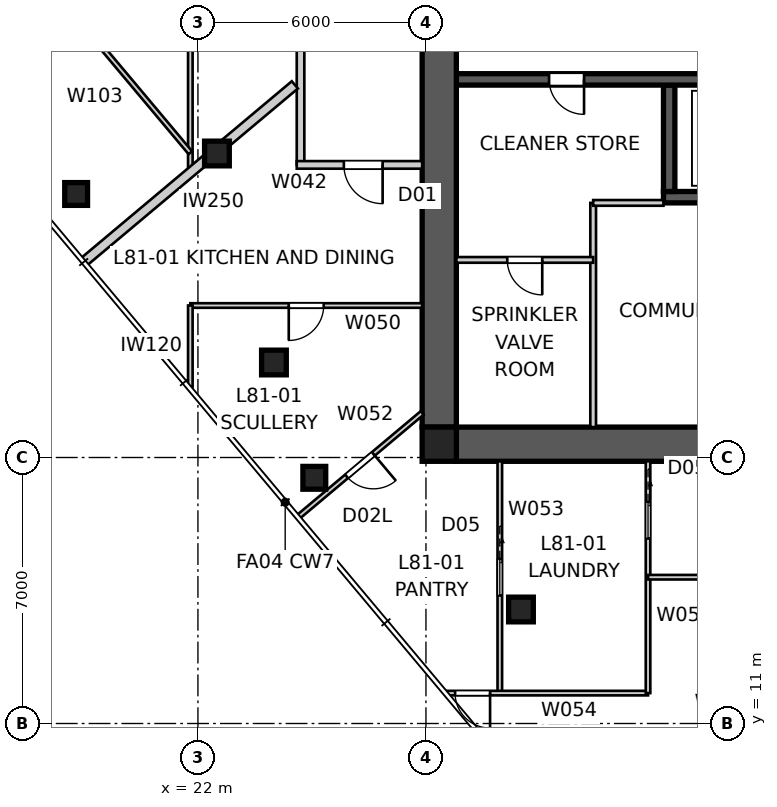
"""IFC4 building model, lengths in metres.
Left out: names, types, materials, properties, quantities, classifications, styles, units other than length and angle.
Written with IfcOpenShell. Run it as: python <this file> out.ifc"""

import sys

from ifc_helpers import new_model, si_unit, direction, frame, frame_2d, origin, origin_2d, place, context, subcontext, project, spatial, polyline, rectangle, outline, extrude, element, fill, save


model = new_model("IFC4")
c1 = context("Model", 3, precision=1e-05, world=origin(), true_north=direction((0.0, 1.0)))
c2 = subcontext(c1, "Body", "Model", "MODEL_VIEW")
j1 = project(units=[si_unit("LENGTHUNIT", "METRE"), si_unit("PLANEANGLEUNIT", "RADIAN")], contexts=[c1])
p1 = place(None, origin())
s1 = spatial("IfcSite", under=j1, at=p1, CompositionType="ELEMENT")
p2 = place(p1, origin())
s2 = spatial("IfcBuilding", under=s1, at=p2, CompositionType="ELEMENT")
p3 = place(p2, frame((0.0, 0.0, 293.0)))
s3 = spatial("IfcBuildingStorey", under=s2, at=p3, CompositionType="ELEMENT", Elevation=293.0)
p4 = place(p3, frame((51.2, 18.35, 0.0), z_axis=(0.0, 0.0, 1.0), x_axis=(-1.0, 0.0, 0.0)))
e1 = element("IfcWall", 1, at=p4, inside=s3, PredefinedType="SHEAR", context=c2, shape_type="SweptSolid", body=[
    extrude(outline(polyline([(0.0, -0.45), (22.4, -0.45), (22.4, -0.025), (22.85, -0.025), (22.85, 0.025), (22.4, 0.025), (22.4, 0.45), (0.0, 0.45), (0.0, 0.025), (-0.45, 0.025), (-0.45, -0.025), (0.0, -0.025), (0.0, -0.45)])), origin(), (0.0, 0.0, 1.0), 3.4),
])
p5 = place(p3, frame((28.35, 41.2, 0.0), z_axis=(0.0, 0.0, 1.0), x_axis=(0.0, -1.0, 0.0)))
e2 = element("IfcWall", 2, at=p5, inside=s3, PredefinedType="SHEAR", context=c2, shape_type="SweptSolid", body=[
    extrude(outline(polyline([(0.0, -0.45), (22.4, -0.45), (22.4, -0.025), (22.85, -0.025), (22.85, 0.025), (22.4, 0.025), (22.4, 0.45), (0.0, 0.45), (0.0, 0.025), (-0.45, 0.025), (-0.45, -0.025), (0.0, -0.025), (0.0, -0.45)])), origin(), (0.0, 0.0, 1.0), 3.4),
])
p6 = place(p5, frame((11.14, 0.0, 0.0)))
e3 = element("IfcOpeningElement", 3, at=p6, cuts=e2, PredefinedType="OPENING", context=c2, shape_type="SweptSolid", body=[
    extrude(rectangle(XDim=1.02, YDim=2.4, at=frame_2d((0.51, 1.2))), frame((0.0, 0.46, 0.0), z_axis=(0.0, -1.0, 0.0), x_axis=(1.0, 0.0, 0.0)), (0.0, 0.0, 1.0), 0.92),
])
p7 = place(p3, frame((51.2, 27.95, 0.0), z_axis=(0.0, 0.0, 1.0), x_axis=(-1.0, 0.0, 0.0)))
e4 = element("IfcWall", 4, at=p7, inside=s3, PredefinedType="SHEAR", context=c2, shape_type="SweptSolid", body=[
    extrude(rectangle(XDim=22.4, YDim=0.3, at=frame_2d((11.2, 0.0))), origin(), (0.0, 0.0, 1.0), 3.4),
])
p8 = place(p7, frame((19.04, 0.0, 0.0)))
e5 = element("IfcOpeningElement", 5, at=p8, cuts=e4, PredefinedType="OPENING", context=c2, shape_type="SweptSolid", body=[
    extrude(rectangle(XDim=0.92, YDim=2.1, at=frame_2d((0.46, 1.05))), frame((0.0, 0.16, 0.0), z_axis=(0.0, -1.0, 0.0), x_axis=(1.0, 0.0, 0.0)), (0.0, 0.0, 1.0), 0.32),
])
p9 = place(p7, frame((1.265, 0.0, 0.0)))
e6 = element("IfcOpeningElement", 6, at=p9, cuts=e4, PredefinedType="OPENING", context=c2, shape_type="SweptSolid", body=[
    extrude(rectangle(XDim=1.02, YDim=2.1, at=frame_2d((0.51, 1.05))), frame((0.0, 0.16, 0.0), z_axis=(0.0, -1.0, 0.0), x_axis=(1.0, 0.0, 0.0)), (0.0, 0.0, 1.0), 0.32),
])
p10 = place(p7, frame((4.015, 0.0, 0.0)))
e7 = element("IfcOpeningElement", 7, at=p10, cuts=e4, PredefinedType="OPENING", context=c2, shape_type="SweptSolid", body=[
    extrude(rectangle(XDim=0.92, YDim=2.1, at=frame_2d((0.46, 1.05))), frame((0.0, 0.16, 0.0), z_axis=(0.0, -1.0, 0.0), x_axis=(1.0, 0.0, 0.0)), (0.0, 0.0, 1.0), 0.32),
])
p11 = place(p7, frame((8.89, 0.0, 0.0)))
e8 = element("IfcOpeningElement", 8, at=p11, cuts=e4, PredefinedType="OPENING", context=c2, shape_type="SweptSolid", body=[
    extrude(rectangle(XDim=0.92, YDim=2.1, at=frame_2d((0.46, 1.05))), frame((0.0, 0.16, 0.0), z_axis=(0.0, -1.0, 0.0), x_axis=(1.0, 0.0, 0.0)), (0.0, 0.0, 1.0), 0.32),
])
p12 = place(p7, frame((6.565, 0.0, 0.0)))
e9 = element("IfcOpeningElement", 9, at=p12, cuts=e4, PredefinedType="OPENING", context=c2, shape_type="SweptSolid", body=[
    extrude(rectangle(XDim=0.92, YDim=2.1, at=frame_2d((0.46, 1.05))), frame((0.0, 0.16, 0.0), z_axis=(0.0, -1.0, 0.0), x_axis=(1.0, 0.0, 0.0)), (0.0, 0.0, 1.0), 0.32),
])
p13 = place(p7, frame((12.05, 0.0, 0.0)))
e10 = element("IfcOpeningElement", 10, at=p13, cuts=e4, PredefinedType="OPENING", context=c2, shape_type="SweptSolid", body=[
    extrude(rectangle(XDim=1.1, YDim=2.1, at=frame_2d((0.55, 1.05))), frame((0.0, 0.16, 0.0), z_axis=(0.0, -1.0, 0.0), x_axis=(1.0, 0.0, 0.0)), (0.0, 0.0, 1.0), 0.32),
])
p14 = place(p7, frame((14.85, 0.0, 0.0)))
e11 = element("IfcOpeningElement", 11, at=p14, cuts=e4, PredefinedType="OPENING", context=c2, shape_type="SweptSolid", body=[
    extrude(rectangle(XDim=1.1, YDim=2.1, at=frame_2d((0.55, 1.05))), frame((0.0, 0.16, 0.0), z_axis=(0.0, -1.0, 0.0), x_axis=(1.0, 0.0, 0.0)), (0.0, 0.0, 1.0), 0.32),
])
p15 = place(p3, frame((45.75, 24.85, 0.0), z_axis=(0.0, 0.0, 1.0), x_axis=(-1.0, 0.0, 0.0)))
e12 = element("IfcWall", 12, at=p15, inside=s3, PredefinedType="SHEAR", context=c2, shape_type="SweptSolid", body=[
    extrude(rectangle(XDim=11.5, YDim=0.3, at=frame_2d((5.75, 0.0))), origin(), (0.0, 0.0, 1.0), 3.4),
])
p16 = place(p3, frame((34.4, 27.8, 0.0), z_axis=(0.0, 0.0, 1.0), x_axis=(0.0, -1.0, 0.0)))
e13 = element("IfcWall", 13, at=p16, inside=s3, PredefinedType="SHEAR", context=c2, shape_type="SweptSolid", body=[
    extrude(rectangle(XDim=2.8, YDim=0.3, at=frame_2d((1.4, 0.0))), origin(), (0.0, 0.0, 1.0), 3.4),
])
p17 = place(p3, frame((28.35, 18.35, 0.0), z_axis=(0.0, 0.0, 1.0), x_axis=(1.0, 0.0, 0.0)))
e14 = element("IfcColumn", 14, at=p17, inside=s3, PredefinedType="COLUMN", context=c2, shape_type="SweptSolid", body=[
    extrude(rectangle(XDim=0.9, YDim=0.9, at=origin_2d()), origin(), (0.0, 0.0, 1.0), 3.4),
])
for number, where, z_axis, x_axis in (
    (15, (18.795, 24.935, 0.0), (0.0, 0.0, 1.0), (1.0, 0.0, 0.0)),
    (16, (25.062, 17.466, 0.0), (0.0, 0.0, 1.0), (1.0, 0.0, 0.0)),
):
    element("IfcColumn", number, at=place(p3, frame(where, z_axis=z_axis, x_axis=x_axis)), inside=s3, PredefinedType="COLUMN", context=c2, shape_type="SweptSolid", body=[
        extrude(rectangle(XDim=0.6, YDim=0.6, at=origin_2d()), origin(), (0.0, 0.0, 1.0), 3.4),
    ])
for number, where, z_axis, x_axis in (
    (17, (22.5, 26.0, 0.0), (0.0, 0.0, 1.0), (1.0, 0.0, 0.0)),
    (18, (24.0, 20.5, 0.0), (0.0, 0.0, 1.0), (1.0, 0.0, 0.0)),
    (19, (30.5, 14.0, 0.0), (0.0, 0.0, 1.0), (1.0, 0.0, 0.0)),
):
    element("IfcColumn", number, at=place(p3, frame(where, z_axis=z_axis, x_axis=x_axis)), inside=s3, PredefinedType="COLUMN", context=c2, shape_type="SweptSolid", body=[
        extrude(rectangle(XDim=0.65, YDim=0.65, at=origin_2d()), origin(), (0.0, 0.0, 1.0), 3.4),
    ])
p18 = place(p3, frame((24.7, 25.7, 0.0), z_axis=(0.0, 0.0, 1.0), x_axis=(0.0, 1.0, 0.0)))
e20 = element("IfcWall", 20, at=p18, inside=s3, PredefinedType="PARTITIONING", context=c2, shape_type="SweptSolid", body=[
    extrude(rectangle(XDim=8.6, YDim=0.2, at=frame_2d((4.3, 0.0))), origin(), (0.0, 0.0, 1.0), 3.25),
])
p19 = place(p18, frame((4.734, 0.0, 0.0)))
e21 = element("IfcOpeningElement", 21, at=p19, cuts=e20, PredefinedType="OPENING", context=c2, shape_type="SweptSolid", body=[
    extrude(rectangle(XDim=1.02, YDim=2.34, at=frame_2d((0.51, 1.17))), frame((0.0, 0.11, 0.0), z_axis=(0.0, -1.0, 0.0), x_axis=(1.0, 0.0, 0.0)), (0.0, 0.0, 1.0), 0.22),
])
p20 = place(p3, frame((27.9, 25.7, 0.0), z_axis=(0.0, 0.0, 1.0), x_axis=(-1.0, 0.0, 0.0)))
e22 = element("IfcWall", 22, at=p20, inside=s3, PredefinedType="PARTITIONING", context=c2, shape_type="SweptSolid", body=[
    extrude(rectangle(XDim=3.3, YDim=0.2, at=frame_2d((1.65, 0.0))), origin(), (0.0, 0.0, 1.0), 3.25),
])
p21 = place(p20, frame((1.04, 0.0, 0.0)))
e23 = element("IfcOpeningElement", 23, at=p21, cuts=e22, PredefinedType="OPENING", context=c2, shape_type="SweptSolid", body=[
    extrude(rectangle(XDim=1.02, YDim=2.34, at=frame_2d((0.51, 1.17))), frame((0.0, 0.11, 0.0), z_axis=(0.0, -1.0, 0.0), x_axis=(1.0, 0.0, 0.0)), (0.0, 0.0, 1.0), 0.22),
])
p22 = place(p3, frame((18.993, 23.143, 0.0), z_axis=(0.0, 0.0, 1.0), x_axis=(0.766054150891, 0.642776040237, 0.0)))
e24 = element("IfcWall", 24, at=p22, inside=s3, PredefinedType="PARTITIONING", context=c2, shape_type="SweptSolid", body=[
    extrude(rectangle(XDim=7.254, YDim=0.25, at=frame_2d((3.627, 0.0))), origin(), (0.0, 0.0, 1.0), 3.25),
])
p23 = place(p3, frame((32.4, 18.8, 0.0), z_axis=(0.0, 0.0, 1.0), x_axis=(0.0, 1.0, 0.0)))
e25 = element("IfcWall", 25, at=p23, inside=s3, PredefinedType="SOLIDWALL", context=c2, shape_type="SweptSolid", body=[
    extrude(rectangle(XDim=5.9, YDim=0.15, at=frame_2d((2.95, 0.0))), origin(), (0.0, 0.0, 1.0), 3.25),
])
p24 = place(p3, frame((32.4, 24.7, 0.0), z_axis=(0.0, 0.0, 1.0), x_axis=(1.0, 0.0, 0.0)))
e26 = element("IfcWall", 26, at=p24, inside=s3, PredefinedType="SOLIDWALL", context=c2, shape_type="SweptSolid", body=[
    extrude(rectangle(XDim=1.85, YDim=0.15, at=frame_2d((0.925, 0.0))), origin(), (0.0, 0.0, 1.0), 3.25),
])
p25 = place(p3, frame((32.4, 23.2, 0.0), z_axis=(0.0, 0.0, 1.0), x_axis=(-1.0, 0.0, 0.0)))
e27 = element("IfcWall", 27, at=p25, inside=s3, PredefinedType="SOLIDWALL", context=c2, shape_type="SweptSolid", body=[
    extrude(rectangle(XDim=3.6, YDim=0.15, at=frame_2d((1.8, 0.0))), origin(), (0.0, 0.0, 1.0), 3.25),
])
p26 = place(p25, frame((1.34, 0.0, 0.0)))
e28 = element("IfcOpeningElement", 28, at=p26, cuts=e27, PredefinedType="OPENING", context=c2, shape_type="SweptSolid", body=[
    extrude(rectangle(XDim=0.92, YDim=2.1, at=frame_2d((0.46, 1.05))), frame((0.0, 0.085, 0.0), z_axis=(0.0, -1.0, 0.0), x_axis=(1.0, 0.0, 0.0)), (0.0, 0.0, 1.0), 0.17),
])
p27 = place(p3, frame((27.9, 22.0, 0.0), z_axis=(0.0, 0.0, 1.0), x_axis=(-1.0, 0.0, 0.0)))
e29 = element("IfcWall", 29, at=p27, inside=s3, PredefinedType="PARTITIONING", context=c2, shape_type="SweptSolid", body=[
    extrude(rectangle(XDim=6.1, YDim=0.12, at=frame_2d((3.05, 0.0))), origin(), (0.0, 0.0, 1.0), 3.25),
])
p28 = place(p27, frame((2.59, 0.0, 0.0)))
e30 = element("IfcOpeningElement", 30, at=p28, cuts=e29, PredefinedType="OPENING", context=c2, shape_type="SweptSolid", body=[
    extrude(rectangle(XDim=0.92, YDim=2.34, at=frame_2d((0.46, 1.17))), frame((0.0, 0.07, 0.0), z_axis=(0.0, -1.0, 0.0), x_axis=(1.0, 0.0, 0.0)), (0.0, 0.0, 1.0), 0.14),
])
p29 = place(p3, frame((21.8, 22.0, 0.0), z_axis=(0.0, 0.0, 1.0), x_axis=(0.0, -1.0, 0.0)))
e31 = element("IfcWall", 31, at=p29, inside=s3, PredefinedType="PARTITIONING", context=c2, shape_type="SweptSolid", body=[
    extrude(rectangle(XDim=2.14, YDim=0.12, at=frame_2d((1.07, 0.0))), origin(), (0.0, 0.0, 1.0), 3.25),
])
p30 = place(p3, frame((27.9, 19.172, 0.0), z_axis=(0.0, 0.0, 1.0), x_axis=(-0.766017381482, -0.642819859111, 0.0)))
e32 = element("IfcWall", 32, at=p30, inside=s3, PredefinedType="PARTITIONING", context=c2, shape_type="SweptSolid", body=[
    extrude(rectangle(XDim=4.231, YDim=0.12, at=frame_2d((2.115, 0.0))), origin(), (0.0, 0.0, 1.0), 3.25),
])
p31 = place(p30, frame((1.676, 0.0, 0.0)))
e33 = element("IfcOpeningElement", 33, at=p31, cuts=e32, PredefinedType="OPENING", context=c2, shape_type="SweptSolid", body=[
    extrude(rectangle(XDim=0.92, YDim=2.1, at=frame_2d((0.46, 1.05))), frame((0.0, 0.07, 0.0), z_axis=(0.0, -1.0, 0.0), x_axis=(1.0, 0.0, 0.0)), (0.0, 0.0, 1.0), 0.14),
])
p32 = place(p3, frame((29.944, 17.9, 0.0), z_axis=(0.0, 0.0, 1.0), x_axis=(0.0, -1.0, 0.0)))
e34 = element("IfcWall", 34, at=p32, inside=s3, PredefinedType="PARTITIONING", context=c2, shape_type="SweptSolid", body=[
    extrude(rectangle(XDim=6.1, YDim=0.12, at=frame_2d((3.05, 0.0))), origin(), (0.0, 0.0, 1.0), 3.25),
])
p33 = place(p32, frame((2.57, 0.0, 0.0)))
e35 = element("IfcOpeningElement", 35, at=p33, cuts=e34, PredefinedType="OPENING", context=c2, shape_type="SweptSolid", body=[
    extrude(rectangle(XDim=0.96, YDim=2.1, at=frame_2d((0.48, 1.05))), frame((0.0, 0.07, 0.0), z_axis=(0.0, -1.0, 0.0), x_axis=(1.0, 0.0, 0.0)), (0.0, 0.0, 1.0), 0.14),
])
p34 = place(p3, frame((33.844, 11.8, 0.0), z_axis=(0.0, 0.0, 1.0), x_axis=(-1.0, 0.0, 0.0)))
e36 = element("IfcWall", 36, at=p34, inside=s3, PredefinedType="PARTITIONING", context=c2, shape_type="SweptSolid", body=[
    extrude(rectangle(XDim=5.281, YDim=0.12, at=frame_2d((2.64, 0.0))), origin(), (0.0, 0.0, 1.0), 3.25),
])
p35 = place(p34, frame((4.156, 0.0, 0.0)))
e37 = element("IfcOpeningElement", 37, at=p35, cuts=e36, PredefinedType="OPENING", context=c2, shape_type="SweptSolid", body=[
    extrude(rectangle(XDim=0.92, YDim=2.34, at=frame_2d((0.46, 1.17))), frame((0.0, 0.07, 0.0), z_axis=(0.0, -1.0, 0.0), x_axis=(1.0, 0.0, 0.0)), (0.0, 0.0, 1.0), 0.14),
])
p36 = place(p3, frame((33.844, 17.9, 0.0), z_axis=(0.0, 0.0, 1.0), x_axis=(0.0, -1.0, 0.0)))
e38 = element("IfcWall", 38, at=p36, inside=s3, PredefinedType="PARTITIONING", context=c2, shape_type="SweptSolid", body=[
    extrude(rectangle(XDim=6.1, YDim=0.12, at=frame_2d((3.05, 0.0))), origin(), (0.0, 0.0, 1.0), 3.25),
])
p37 = place(p36, frame((1.07, 0.0, 0.0)))
e39 = element("IfcOpeningElement", 39, at=p37, cuts=e38, PredefinedType="OPENING", context=c2, shape_type="SweptSolid", body=[
    extrude(rectangle(XDim=0.96, YDim=2.1, at=frame_2d((0.48, 1.05))), frame((0.0, 0.07, 0.0), z_axis=(0.0, -1.0, 0.0), x_axis=(1.0, 0.0, 0.0)), (0.0, 0.0, 1.0), 0.14),
])
p38 = place(p3, frame((39.156, 14.85, 0.0), z_axis=(0.0, 0.0, 1.0), x_axis=(-1.0, 0.0, 0.0)))
e40 = element("IfcWall", 40, at=p38, inside=s3, PredefinedType="PARTITIONING", context=c2, shape_type="SweptSolid", body=[
    extrude(rectangle(XDim=5.312, YDim=0.12, at=frame_2d((2.656, 0.0))), origin(), (0.0, 0.0, 1.0), 3.25),
])
p39 = place(p3, frame((32.281, 7.369, 0.0), z_axis=(0.0, 0.0, 1.0), x_axis=(0.766036842262, 0.642796667926, 0.0)))
e41 = element("IfcWall", 41, at=p39, inside=s3, PredefinedType="PARTITIONING", context=c2, shape_type="SweptSolid", body=[
    extrude(rectangle(XDim=6.894, YDim=0.12, at=frame_2d((3.447, 0.0))), origin(), (0.0, 0.0, 1.0), 3.25),
])
p40 = place(p39, frame((2.967, 0.0, 0.0)))
e42 = element("IfcOpeningElement", 42, at=p40, cuts=e41, PredefinedType="OPENING", context=c2, shape_type="SweptSolid", body=[
    extrude(rectangle(XDim=0.92, YDim=2.34, at=frame_2d((0.46, 1.17))), frame((0.0, 0.07, 0.0), z_axis=(0.0, -1.0, 0.0), x_axis=(1.0, 0.0, 0.0)), (0.0, 0.0, 1.0), 0.14),
])
p41 = place(p3, frame((21.8, 25.498, 0.0), z_axis=(0.0, 0.0, 1.0), x_axis=(0.0, 1.0, 0.0)))
e43 = element("IfcWall", 43, at=p41, inside=s3, PredefinedType="PARTITIONING", context=c2, shape_type="SweptSolid", body=[
    extrude(rectangle(XDim=15.939, YDim=0.12, at=frame_2d((7.969, 0.0))), origin(), (0.0, 0.0, 1.0), 3.25),
])
p42 = place(p41, frame((4.486, 0.0, 0.0)))
e44 = element("IfcOpeningElement", 44, at=p42, cuts=e43, PredefinedType="OPENING", context=c2, shape_type="SweptSolid", body=[
    extrude(rectangle(XDim=0.92, YDim=2.34, at=frame_2d((0.46, 1.17))), frame((0.0, 0.07, 0.0), z_axis=(0.0, -1.0, 0.0), x_axis=(1.0, 0.0, 0.0)), (0.0, 0.0, 1.0), 0.14),
])
p43 = place(p41, frame((14.713, 0.0, 0.0)))
e45 = element("IfcOpeningElement", 45, at=p43, cuts=e43, PredefinedType="OPENING", context=c2, shape_type="SweptSolid", body=[
    extrude(rectangle(XDim=0.92, YDim=2.34, at=frame_2d((0.46, 1.17))), frame((0.0, 0.07, 0.0), z_axis=(0.0, -1.0, 0.0), x_axis=(1.0, 0.0, 0.0)), (0.0, 0.0, 1.0), 0.14),
])
p44 = place(p3, frame((21.8, 26.021, 0.0), z_axis=(0.0, 0.0, 1.0), x_axis=(-0.642785106342, 0.766046543668, 0.0)))
e46 = element("IfcWall", 46, at=p44, inside=s3, PredefinedType="PARTITIONING", context=c2, shape_type="SweptSolid", body=[
    extrude(rectangle(XDim=7.81, YDim=0.12, at=frame_2d((3.905, 0.0))), origin(), (0.0, 0.0, 1.0), 3.25),
])
p45 = place(p44, frame((5.465, 0.0, 0.0)))
e47 = element("IfcOpeningElement", 47, at=p45, cuts=e46, PredefinedType="OPENING", context=c2, shape_type="SweptSolid", body=[
    extrude(rectangle(XDim=0.92, YDim=2.34, at=frame_2d((0.46, 1.17))), frame((0.0, 0.07, 0.0), z_axis=(0.0, -1.0, 0.0), x_axis=(1.0, 0.0, 0.0)), (0.0, 0.0, 1.0), 0.14),
])
p46 = place(p8, origin())
e48 = element("IfcDoor", 48, at=p46, inside=s3, OperationType="SINGLE_SWING_LEFT", PredefinedType="DOOR", context=c2, shape_type="SweptSolid", body=[
    extrude(rectangle(XDim=0.92, YDim=2.1, at=frame_2d((0.46, 1.05))), frame((0.0, 0.025, 0.0), z_axis=(0.0, -1.0, 0.0), x_axis=(1.0, 0.0, 0.0)), (0.0, 0.0, 1.0), 0.05),
])
fill(e5, e48)
p47 = place(p21, origin())
e49 = element("IfcDoor", 49, at=p47, inside=s3, OperationType="SINGLE_SWING_LEFT", PredefinedType="DOOR", context=c2, shape_type="SweptSolid", body=[
    extrude(rectangle(XDim=1.02, YDim=2.34, at=frame_2d((0.51, 1.17))), frame((0.0, 0.025, 0.0), z_axis=(0.0, -1.0, 0.0), x_axis=(1.0, 0.0, 0.0)), (0.0, 0.0, 1.0), 0.05),
])
fill(e23, e49)
p48 = place(p26, origin())
e50 = element("IfcDoor", 50, at=p48, inside=s3, OperationType="SINGLE_SWING_LEFT", PredefinedType="DOOR", context=c2, shape_type="SweptSolid", body=[
    extrude(rectangle(XDim=0.92, YDim=2.1, at=frame_2d((0.46, 1.05))), frame((0.0, 0.025, 0.0), z_axis=(0.0, -1.0, 0.0), x_axis=(1.0, 0.0, 0.0)), (0.0, 0.0, 1.0), 0.05),
])
fill(e28, e50)
p49 = place(p28, origin())
e51 = element("IfcDoor", 51, at=p49, inside=s3, OperationType="SINGLE_SWING_RIGHT", PredefinedType="DOOR", context=c2, shape_type="SweptSolid", body=[
    extrude(rectangle(XDim=0.92, YDim=2.34, at=frame_2d((0.46, 1.17))), frame((0.0, 0.025, 0.0), z_axis=(0.0, -1.0, 0.0), x_axis=(1.0, 0.0, 0.0)), (0.0, 0.0, 1.0), 0.05),
])
fill(e30, e51)
p50 = place(p31, origin())
e52 = element("IfcDoor", 52, at=p50, inside=s3, OperationType="SINGLE_SWING_LEFT", PredefinedType="DOOR", context=c2, shape_type="SweptSolid", body=[
    extrude(rectangle(XDim=0.92, YDim=2.1, at=frame_2d((0.46, 1.05))), frame((0.0, 0.025, 0.0), z_axis=(0.0, -1.0, 0.0), x_axis=(1.0, 0.0, 0.0)), (0.0, 0.0, 1.0), 0.05),
])
fill(e33, e52)
p51 = place(p33, origin())
e53 = element("IfcDoor", 53, at=p51, inside=s3, OperationType="SLIDING_TO_LEFT", PredefinedType="DOOR", context=c2, shape_type="SweptSolid", body=[
    extrude(rectangle(XDim=0.96, YDim=2.1, at=frame_2d((0.48, 1.05))), frame((0.0, 0.025, 0.0), z_axis=(0.0, -1.0, 0.0), x_axis=(1.0, 0.0, 0.0)), (0.0, 0.0, 1.0), 0.05),
])
fill(e35, e53)
p52 = place(p35, origin())
e54 = element("IfcDoor", 54, at=p52, inside=s3, OperationType="SINGLE_SWING_LEFT", PredefinedType="DOOR", context=c2, shape_type="SweptSolid", body=[
    extrude(rectangle(XDim=0.92, YDim=2.34, at=frame_2d((0.46, 1.17))), frame((0.0, 0.025, 0.0), z_axis=(0.0, -1.0, 0.0), x_axis=(1.0, 0.0, 0.0)), (0.0, 0.0, 1.0), 0.05),
])
fill(e37, e54)
p53 = place(p37, origin())
e55 = element("IfcDoor", 55, at=p53, inside=s3, OperationType="SLIDING_TO_LEFT", PredefinedType="DOOR", context=c2, shape_type="SweptSolid", body=[
    extrude(rectangle(XDim=0.96, YDim=2.1, at=frame_2d((0.48, 1.05))), frame((0.0, 0.025, 0.0), z_axis=(0.0, -1.0, 0.0), x_axis=(1.0, 0.0, 0.0)), (0.0, 0.0, 1.0), 0.05),
])
fill(e39, e55)
save(model, sys.argv[1])
